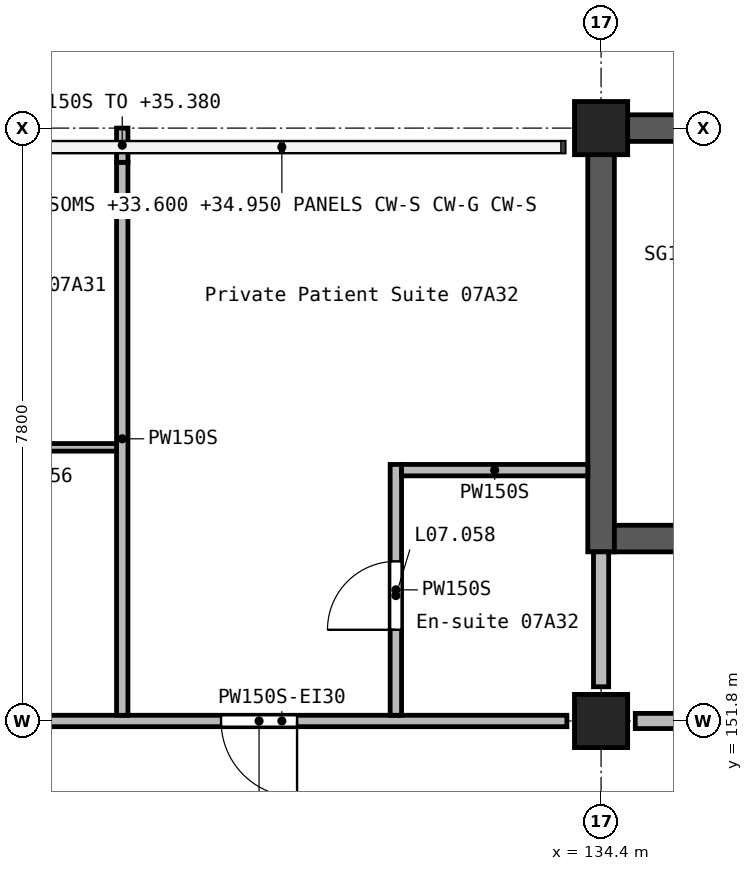
"""IFC4 building model, lengths in metres.
Left out: names, types, materials, properties, quantities, classifications, styles, units other than length and angle.
Written with IfcOpenShell. Run it as: python <this file> out.ifc"""

import sys

from ifc_helpers import new_model, si_unit, direction, frame, frame_2d, origin, origin_2d, place, context, subcontext, project, spatial, rectangle, extrude, element, fill, save


model = new_model("IFC4")
c1 = context("Model", 3, precision=1e-05, world=origin(), true_north=direction((0.0, 1.0)))
c2 = subcontext(c1, "Body", "Model", "MODEL_VIEW")
j1 = project(units=[si_unit("LENGTHUNIT", "METRE"), si_unit("PLANEANGLEUNIT", "RADIAN")], contexts=[c1])
p1 = place(None, origin())
s1 = spatial("IfcSite", under=j1, at=p1, CompositionType="ELEMENT")
p2 = place(p1, origin())
s2 = spatial("IfcBuilding", under=s1, at=p2, CompositionType="ELEMENT")
p3 = place(p2, frame((0.0, 0.0, 32.7)))
s3 = spatial("IfcBuildingStorey", under=s2, at=p3, CompositionType="ELEMENT", Elevation=32.7)
for number, where, z_axis, x_axis in (
    (1, (134.4, 151.8, 0.0), (0.0, 0.0, 1.0), (1.0, 0.0, 0.0)),
    (2, (134.4, 159.6, 0.0), (0.0, 0.0, 1.0), (1.0, 0.0, 0.0)),
):
    element("IfcColumn", number, at=place(p3, frame(where, z_axis=z_axis, x_axis=x_axis)), inside=s3, PredefinedType="COLUMN", context=c2, shape_type="SweptSolid", body=[
        extrude(rectangle(XDim=0.7, YDim=0.7, at=origin_2d()), origin(), (0.0, 0.0, 1.0), 3.9),
    ])
p4 = place(p3, frame((134.225, 159.6, 0.0), z_axis=(0.0, 0.0, 1.0), x_axis=(1.0, 0.0, 0.0)))
e3 = element("IfcWall", 3, at=p4, inside=s3, PredefinedType="SHEAR", context=c2, shape_type="SweptSolid", body=[
    extrude(rectangle(XDim=8.4, YDim=0.35, at=frame_2d((4.2, 0.0))), origin(), (0.0, 0.0, 1.0), 3.9),
])
p5 = place(p3, frame((134.4, 154.025, 0.0), z_axis=(0.0, 0.0, 1.0), x_axis=(0.0, 1.0, 0.0)))
e4 = element("IfcWall", 4, at=p5, inside=s3, PredefinedType="SHEAR", context=c2, shape_type="SweptSolid", body=[
    extrude(rectangle(XDim=5.4, YDim=0.35, at=frame_2d((2.7, 0.0))), origin(), (0.0, 0.0, 1.0), 3.9),
])
p6 = place(p3, frame((134.575, 154.2, 0.0), z_axis=(0.0, 0.0, 1.0), x_axis=(1.0, 0.0, 0.0)))
e5 = element("IfcWall", 5, at=p6, inside=s3, PredefinedType="SHEAR", context=c2, shape_type="SweptSolid", body=[
    extrude(rectangle(XDim=8.05, YDim=0.35, at=frame_2d((4.025, 0.0))), origin(), (0.0, 0.0, 1.0), 3.9),
])
p7 = place(p6, frame((6.525, 0.0, 0.0)))
e6 = element("IfcOpeningElement", 6, at=p7, cuts=e5, PredefinedType="OPENING", context=c2, shape_type="SweptSolid", body=[
    extrude(rectangle(XDim=1.1, YDim=2.1, at=frame_2d((0.55, 1.05))), frame((0.0, 0.185, 0.0), z_axis=(0.0, -1.0, 0.0), x_axis=(1.0, 0.0, 0.0)), (0.0, 0.0, 1.0), 0.37),
])
p8 = place(p3, frame((134.85, 151.8, 0.0), z_axis=(0.0, 0.0, 1.0), x_axis=(1.0, 0.0, 0.0)))
e7 = element("IfcWall", 7, at=p8, inside=s3, PredefinedType="SOLIDWALL", context=c2, shape_type="SweptSolid", body=[
    extrude(rectangle(XDim=7.5, YDim=0.2, at=frame_2d((3.75, 0.0))), origin(), (0.0, 0.0, 1.0), 3.6),
])
p9 = place(p8, frame((3.2, 0.0, 0.0)))
e8 = element("IfcOpeningElement", 8, at=p9, cuts=e7, PredefinedType="OPENING", context=c2, shape_type="SweptSolid", body=[
    extrude(rectangle(XDim=1.1, YDim=2.1, at=frame_2d((0.55, 1.05))), frame((0.0, 0.11, 0.0), z_axis=(0.0, -1.0, 0.0), x_axis=(1.0, 0.0, 0.0)), (0.0, 0.0, 1.0), 0.22),
])
p10 = place(p3, frame((134.4, 152.25, 0.0), z_axis=(0.0, 0.0, 1.0), x_axis=(0.0, 1.0, 0.0)))
e9 = element("IfcWall", 9, at=p10, inside=s3, PredefinedType="SOLIDWALL", context=c2, shape_type="SweptSolid", body=[
    extrude(rectangle(XDim=1.775, YDim=0.2, at=frame_2d((0.887, 0.0))), origin(), (0.0, 0.0, 1.0), 3.6),
])
p11 = place(p3, frame((133.95, 151.8, 0.0), z_axis=(0.0, 0.0, 1.0), x_axis=(-1.0, 0.0, 0.0)))
e10 = element("IfcWall", 10, at=p11, inside=s3, PredefinedType="PARTITIONING", context=c2, shape_type="SweptSolid", body=[
    extrude(rectangle(XDim=7.5, YDim=0.15, at=frame_2d((3.75, 0.0))), origin(), (0.0, 0.0, 1.0), 3.6),
])
p12 = place(p11, frame((3.55, 0.0, 0.0)))
e11 = element("IfcOpeningElement", 11, at=p12, cuts=e10, PredefinedType="OPENING", context=c2, shape_type="SweptSolid", body=[
    extrude(rectangle(XDim=1.0, YDim=2.1, at=frame_2d((0.5, 1.05))), frame((0.0, 0.085, 0.0), z_axis=(0.0, -1.0, 0.0), x_axis=(1.0, 0.0, 0.0)), (0.0, 0.0, 1.0), 0.17),
])
p13 = place(p3, frame((128.1, 151.875, 0.0), z_axis=(0.0, 0.0, 1.0), x_axis=(0.0, 1.0, 0.0)))
e12 = element("IfcWall", 12, at=p13, inside=s3, PredefinedType="PARTITIONING", context=c2, shape_type="SweptSolid", body=[
    extrude(rectangle(XDim=7.275, YDim=0.15, at=frame_2d((3.637, 0.0))), origin(), (0.0, 0.0, 1.0), 3.6),
])
p14 = place(p3, frame((128.1, 159.15, 0.0), z_axis=(0.0, 0.0, 1.0), x_axis=(0.0, 1.0, 0.0)))
e13 = element("IfcWall", 13, at=p14, inside=s3, PredefinedType="PARTITIONING", context=c2, shape_type="SweptSolid", body=[
    extrude(rectangle(XDim=0.45, YDim=0.15, at=frame_2d((0.225, 0.0))), origin(), (0.0, 0.0, 1.0), 2.68),
])
p15 = place(p3, frame((131.7, 151.875, 0.0), z_axis=(0.0, 0.0, 1.0), x_axis=(0.0, 1.0, 0.0)))
e14 = element("IfcWall", 14, at=p15, inside=s3, PredefinedType="PARTITIONING", context=c2, shape_type="SweptSolid", body=[
    extrude(rectangle(XDim=3.3, YDim=0.15, at=frame_2d((1.65, 0.0))), origin(), (0.0, 0.0, 1.0), 3.6),
])
p16 = place(p15, frame((1.125, 0.0, 0.0)))
e15 = element("IfcOpeningElement", 15, at=p16, cuts=e14, PredefinedType="OPENING", context=c2, shape_type="SweptSolid", body=[
    extrude(rectangle(XDim=0.9, YDim=2.1, at=frame_2d((0.45, 1.05))), frame((0.0, 0.085, 0.0), z_axis=(0.0, -1.0, 0.0), x_axis=(1.0, 0.0, 0.0)), (0.0, 0.0, 1.0), 0.17),
])
p17 = place(p3, frame((131.775, 155.1, 0.0), z_axis=(0.0, 0.0, 1.0), x_axis=(1.0, 0.0, 0.0)))
e16 = element("IfcWall", 16, at=p17, inside=s3, PredefinedType="PARTITIONING", context=c2, shape_type="SweptSolid", body=[
    extrude(rectangle(XDim=2.45, YDim=0.15, at=frame_2d((1.225, 0.0))), origin(), (0.0, 0.0, 1.0), 3.6),
])
p18 = place(p3, frame((121.875, 155.4, 0.0), z_axis=(0.0, 0.0, 1.0), x_axis=(1.0, 0.0, 0.0)))
e17 = element("IfcWall", 17, at=p18, inside=s3, PredefinedType="PARTITIONING", context=c2, shape_type="SweptSolid", body=[
    extrude(rectangle(XDim=6.15, YDim=0.1, at=frame_2d((3.075, 0.0))), origin(), (0.0, 0.0, 1.0), 3.6),
])
p19 = place(p18, frame((1.0, 0.0, 0.0)))
e18 = element("IfcOpeningElement", 18, at=p19, cuts=e17, PredefinedType="OPENING", context=c2, shape_type="SweptSolid", body=[
    extrude(rectangle(XDim=1.0, YDim=2.1, at=frame_2d((0.5, 1.05))), frame((0.0, 0.06, 0.0), z_axis=(0.0, -1.0, 0.0), x_axis=(1.0, 0.0, 0.0)), (0.0, 0.0, 1.0), 0.12),
])
p20 = place(p18, frame((4.2, 0.0, 0.0)))
e19 = element("IfcOpeningElement", 19, at=p20, cuts=e17, PredefinedType="OPENING", context=c2, shape_type="SweptSolid", body=[
    extrude(rectangle(XDim=0.9, YDim=2.1, at=frame_2d((0.45, 1.05))), frame((0.0, 0.06, 0.0), z_axis=(0.0, -1.0, 0.0), x_axis=(1.0, 0.0, 0.0)), (0.0, 0.0, 1.0), 0.12),
])
p21 = place(p12, frame((1.0, 0.0, 0.0), z_axis=(0.0, 0.0, 1.0), x_axis=(-1.0, 0.0, 0.0)))
e20 = element("IfcDoor", 20, at=p21, inside=s3, OperationType="SINGLE_SWING_LEFT", PredefinedType="DOOR", context=c2, shape_type="SweptSolid", body=[
    extrude(rectangle(XDim=1.0, YDim=2.1, at=frame_2d((0.5, 1.05))), frame((0.0, 0.025, 0.0), z_axis=(0.0, -1.0, 0.0), x_axis=(1.0, 0.0, 0.0)), (0.0, 0.0, 1.0), 0.05),
])
fill(e11, e20)
p22 = place(p16, frame((0.9, 0.0, 0.0), z_axis=(0.0, 0.0, 1.0), x_axis=(-1.0, 0.0, 0.0)))
e21 = element("IfcDoor", 21, at=p22, inside=s3, OperationType="SINGLE_SWING_RIGHT", PredefinedType="DOOR", context=c2, shape_type="SweptSolid", body=[
    extrude(rectangle(XDim=0.9, YDim=2.1, at=frame_2d((0.45, 1.05))), frame((0.0, 0.025, 0.0), z_axis=(0.0, -1.0, 0.0), x_axis=(1.0, 0.0, 0.0)), (0.0, 0.0, 1.0), 0.05),
])
fill(e15, e21)
save(model, sys.argv[1])
